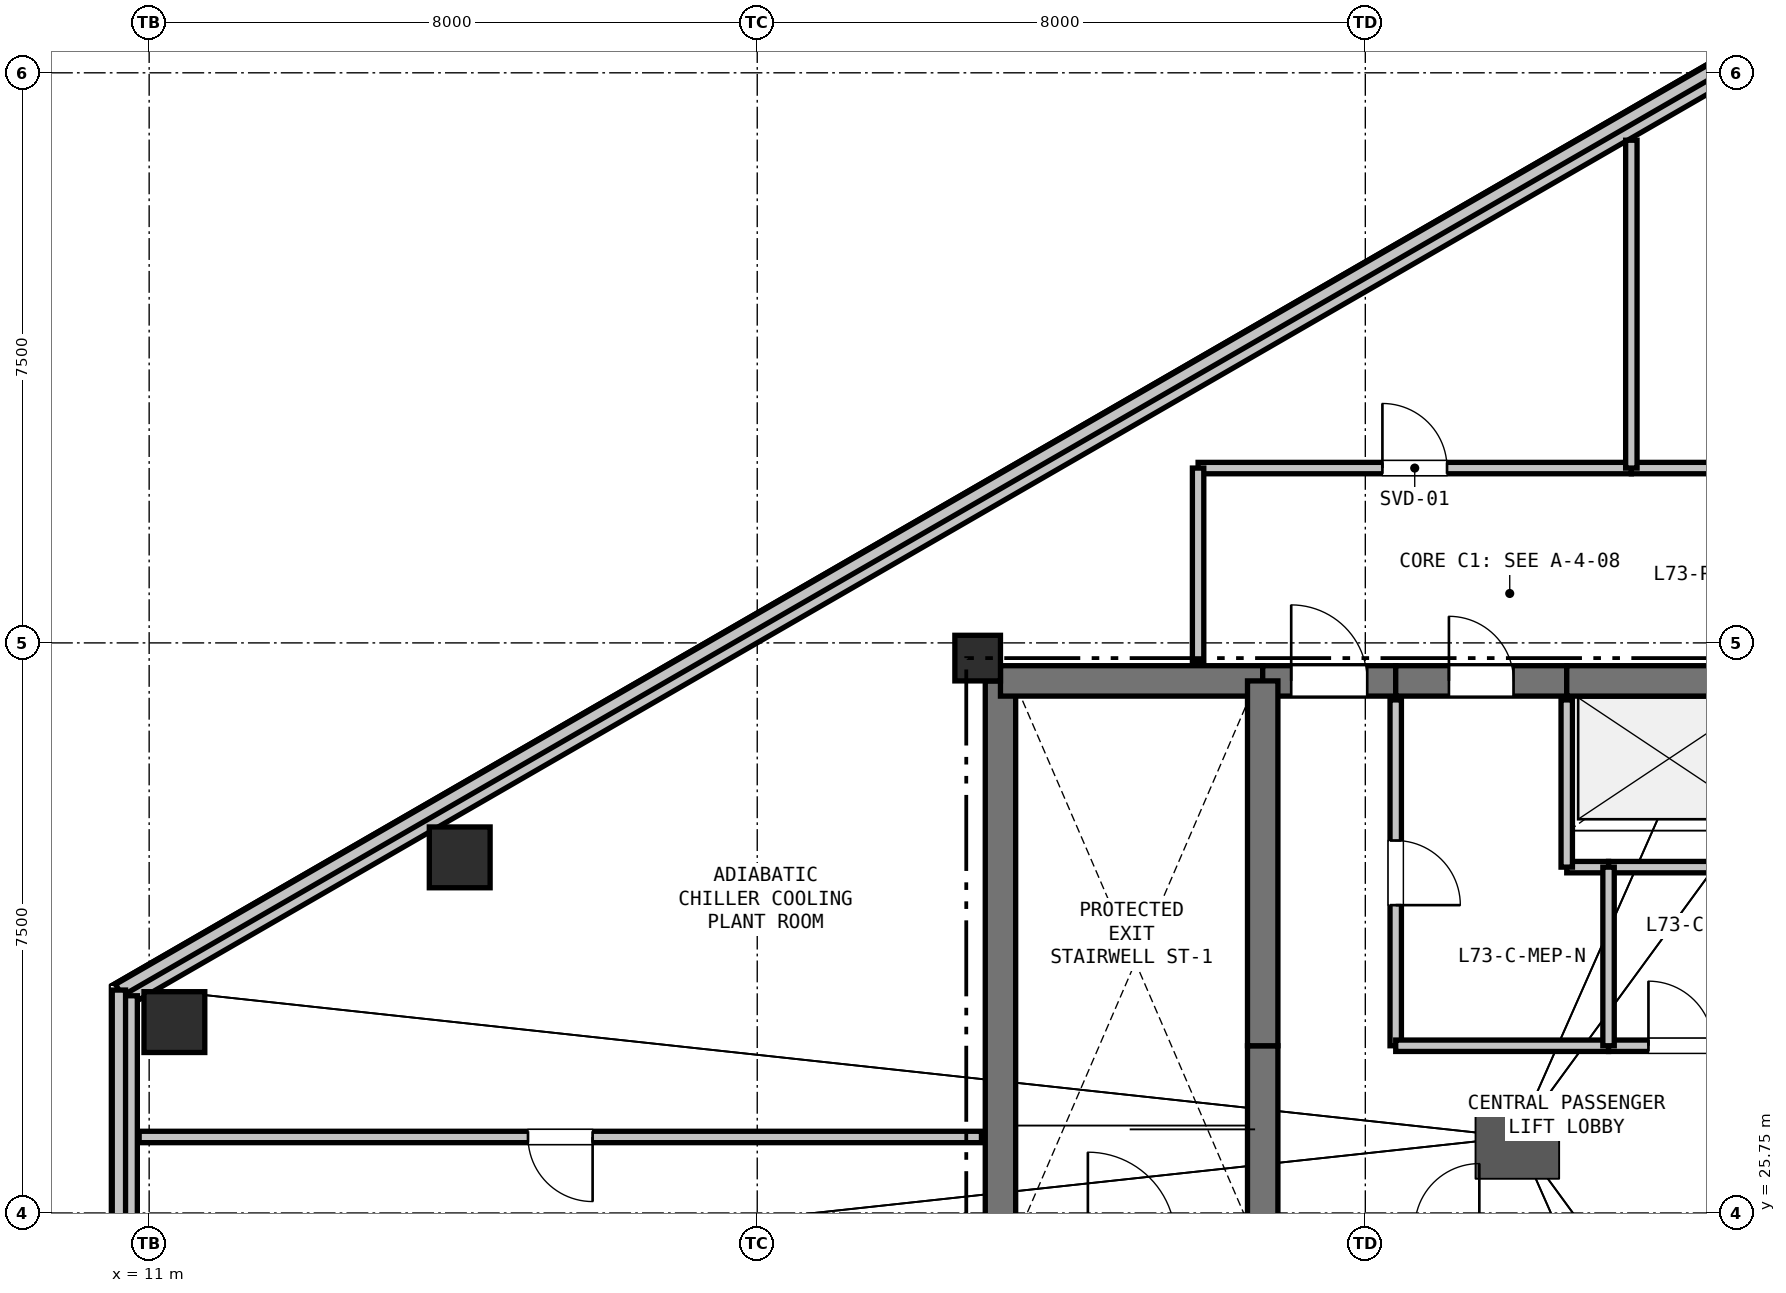
"""IFC4 building model, lengths in metres.
Left out: names, types, materials, properties, quantities, classifications, styles, units other than length and angle.
Written with IfcOpenShell. Run it as: python <this file> out.ifc"""

import sys

from ifc_helpers import new_model, si_unit, direction, frame, frame_2d, origin, origin_2d, place, context, subcontext, project, spatial, rectangle, hollow_rectangle, extrude, element, fill, save


model = new_model("IFC4")
c1 = context("Model", 3, precision=1e-05, world=origin(), true_north=direction((0.0, 1.0)))
c2 = subcontext(c1, "Body", "Model", "MODEL_VIEW")
j1 = project(units=[si_unit("LENGTHUNIT", "METRE"), si_unit("PLANEANGLEUNIT", "RADIAN")], contexts=[c1])
p1 = place(None, origin())
s1 = spatial("IfcSite", under=j1, at=p1, CompositionType="ELEMENT")
p2 = place(p1, origin())
s2 = spatial("IfcBuilding", under=s1, at=p2, CompositionType="ELEMENT")
p3 = place(p2, frame((0.0, 0.0, 264.0)))
s3 = spatial("IfcBuildingStorey", under=s2, at=p3, CompositionType="ELEMENT", Elevation=264.0)
p4 = place(p3, frame((21.9, 33.05, 0.0), z_axis=(0.0, 0.0, 1.0), x_axis=(1.0, 0.0, 0.0)))
e1 = element("IfcColumn", 1, at=p4, inside=s3, PredefinedType="COLUMN", context=c2, shape_type="SweptSolid", body=[
    extrude(rectangle(XDim=0.6, YDim=0.6, at=origin_2d()), origin(), (0.0, 0.0, 1.0), 2.6),
])
for number, where, z_axis, x_axis in (
    (2, (11.332, 28.261, 0.0), (0.0, 0.0, 1.0), (1.0, 0.0, 0.0)),
    (3, (15.086, 30.428, 0.0), (0.0, 0.0, 1.0), (1.0, 0.0, 0.0)),
):
    element("IfcColumn", number, at=place(p3, frame(where, z_axis=z_axis, x_axis=x_axis)), inside=s3, PredefinedType="COLUMN", context=c2, shape_type="SweptSolid", body=[
        extrude(hollow_rectangle(XDim=0.8, YDim=0.8, WallThickness=0.025, at=origin_2d()), origin(), (0.0, 0.0, 1.0), 2.6),
    ])
p5 = place(p3, frame((10.732, 28.608, 0.0), z_axis=(0.0, 0.0, 1.0), x_axis=(0.866023553042, 0.500003205566, 0.0)))
e4 = element("IfcWall", 4, at=p5, inside=s3, PredefinedType="SOLIDWALL", context=c2, shape_type="SweptSolid", body=[
    extrude(rectangle(XDim=29.783, YDim=0.225, at=frame_2d((14.892, 0.0))), origin(), (0.0, 0.0, 1.0), 2.25),
])
p6 = place(p3, frame((10.602, 28.683, 2.7), z_axis=(0.0, 0.0, 1.0), x_axis=(0.866024093284, 0.500002269847, 0.0)))
e5 = element("IfcWall", 5, at=p6, inside=s3, PredefinedType="PARAPET", context=c2, shape_type="SweptSolid", body=[
    extrude(rectangle(XDim=29.933, YDim=0.175, at=frame_2d((14.967, 0.0))), origin(), (0.0, 0.0, 1.0), 1.2),
])
p7 = place(p3, frame((10.732, 24.892, 0.0), z_axis=(0.0, 0.0, 1.0), x_axis=(0.0, 1.0, 0.0)))
e6 = element("IfcWall", 6, at=p7, inside=s3, PredefinedType="SOLIDWALL", context=c2, shape_type="SweptSolid", body=[
    extrude(rectangle(XDim=3.715, YDim=0.225, at=frame_2d((1.858, 0.0))), origin(), (0.0, 0.0, 1.0), 2.25),
])
p8 = place(p3, frame((10.602, 24.817, 2.7), z_axis=(0.0, 0.0, 1.0), x_axis=(0.0, 1.0, 0.0)))
e7 = element("IfcWall", 7, at=p8, inside=s3, PredefinedType="PARAPET", context=c2, shape_type="SweptSolid", body=[
    extrude(rectangle(XDim=3.865, YDim=0.175, at=frame_2d((1.933, 0.0))), origin(), (0.0, 0.0, 1.0), 1.2),
])
p9 = place(p3, frame((22.2, 25.4, 0.0), z_axis=(0.0, 0.0, 1.0), x_axis=(0.0, 1.0, 0.0)))
e8 = element("IfcWall", 8, at=p9, inside=s3, PredefinedType="SHEAR", context=c2, shape_type="SweptSolid", body=[
    extrude(rectangle(XDim=7.35, YDim=0.4, at=frame_2d((3.675, 0.0))), origin(), (0.0, 0.0, 1.0), 2.6),
])
p10 = place(p3, frame((22.2, 32.75, 0.0), z_axis=(0.0, 0.0, 1.0), x_axis=(1.0, 0.0, 0.0)))
e9 = element("IfcWall", 9, at=p10, inside=s3, PredefinedType="SHEAR", context=c2, shape_type="SweptSolid", body=[
    extrude(rectangle(XDim=3.45, YDim=0.4, at=frame_2d((1.725, 0.0))), origin(), (0.0, 0.0, 1.0), 2.6),
])
p11 = place(p3, frame((25.65, 32.75, 0.0), z_axis=(0.0, 0.0, 1.0), x_axis=(1.0, 0.0, 0.0)))
e10 = element("IfcWall", 10, at=p11, inside=s3, PredefinedType="SHEAR", context=c2, shape_type="SweptSolid", body=[
    extrude(rectangle(XDim=1.75, YDim=0.4, at=frame_2d((0.875, 0.0))), origin(), (0.0, 0.0, 1.0), 2.6),
])
p12 = place(p11, frame((0.375, 0.0, 0.0)))
e11 = element("IfcOpeningElement", 11, at=p12, cuts=e10, PredefinedType="OPENING", context=c2, shape_type="SweptSolid", body=[
    extrude(rectangle(XDim=1.0, YDim=2.15, at=frame_2d((0.5, 1.075))), frame((0.0, 0.21, 0.0), z_axis=(0.0, -1.0, 0.0), x_axis=(1.0, 0.0, 0.0)), (0.0, 0.0, 1.0), 0.42),
])
p13 = place(p3, frame((27.4, 32.75, 0.0), z_axis=(0.0, 0.0, 1.0), x_axis=(1.0, 0.0, 0.0)))
e12 = element("IfcWall", 12, at=p13, inside=s3, PredefinedType="SHEAR", context=c2, shape_type="SweptSolid", body=[
    extrude(rectangle(XDim=2.25, YDim=0.4, at=frame_2d((1.125, 0.0))), origin(), (0.0, 0.0, 1.0), 2.6),
])
p14 = place(p13, frame((0.7, 0.0, 0.0)))
e13 = element("IfcOpeningElement", 13, at=p14, cuts=e12, PredefinedType="OPENING", context=c2, shape_type="SweptSolid", body=[
    extrude(rectangle(XDim=0.85, YDim=2.1, at=frame_2d((0.425, 1.05))), frame((0.0, 0.21, 0.0), z_axis=(0.0, -1.0, 0.0), x_axis=(1.0, 0.0, 0.0)), (0.0, 0.0, 1.0), 0.42),
])
p15 = place(p3, frame((29.65, 32.75, 0.0), z_axis=(0.0, 0.0, 1.0), x_axis=(1.0, 0.0, 0.0)))
e14 = element("IfcWall", 14, at=p15, inside=s3, PredefinedType="SHEAR", context=c2, shape_type="SweptSolid", body=[
    extrude(rectangle(XDim=2.7, YDim=0.4, at=frame_2d((1.35, 0.0))), origin(), (0.0, 0.0, 1.0), 2.6),
])
p16 = place(p3, frame((25.65, 25.55, 0.0), z_axis=(0.0, 0.0, 1.0), x_axis=(0.0, 1.0, 0.0)))
e15 = element("IfcWall", 15, at=p16, inside=s3, PredefinedType="SHEAR", context=c2, shape_type="SweptSolid", body=[
    extrude(rectangle(XDim=2.4, YDim=0.4, at=frame_2d((1.2, 0.0))), origin(), (0.0, 0.0, 1.0), 2.6),
])
p17 = place(p3, frame((25.65, 27.95, 0.0), z_axis=(0.0, 0.0, 1.0), x_axis=(0.0, 1.0, 0.0)))
e16 = element("IfcWall", 16, at=p17, inside=s3, PredefinedType="SHEAR", context=c2, shape_type="SweptSolid", body=[
    extrude(rectangle(XDim=4.8, YDim=0.4, at=frame_2d((2.4, 0.0))), origin(), (0.0, 0.0, 1.0), 2.6),
])
p18 = place(p3, frame((32.1, 30.3, 0.0), z_axis=(0.0, 0.0, 1.0), x_axis=(-1.0, 0.0, 0.0)))
e17 = element("IfcWall", 17, at=p18, inside=s3, PredefinedType="PARTITIONING", context=c2, shape_type="SweptSolid", body=[
    extrude(rectangle(XDim=1.9, YDim=0.15, at=frame_2d((0.95, 0.0))), origin(), (0.0, 0.0, 1.0), 2.6),
])
p19 = place(p3, frame((30.2, 30.3, 0.0), z_axis=(0.0, 0.0, 1.0), x_axis=(-1.0, 0.0, 0.0)))
e18 = element("IfcWall", 18, at=p19, inside=s3, PredefinedType="PARTITIONING", context=c2, shape_type="SweptSolid", body=[
    extrude(rectangle(XDim=0.55, YDim=0.15, at=frame_2d((0.275, 0.0))), origin(), (0.0, 0.0, 1.0), 2.6),
])
p20 = place(p3, frame((29.65, 30.3, 0.0), z_axis=(0.0, 0.0, 1.0), x_axis=(0.0, 1.0, 0.0)))
e19 = element("IfcWall", 19, at=p20, inside=s3, PredefinedType="PARTITIONING", context=c2, shape_type="SweptSolid", body=[
    extrude(rectangle(XDim=2.2, YDim=0.15, at=frame_2d((1.1, 0.0))), origin(), (0.0, 0.0, 1.0), 2.6),
])
p21 = place(p3, frame((27.4, 32.5, 0.0), z_axis=(0.0, 0.0, 1.0), x_axis=(0.0, -1.0, 0.0)))
e20 = element("IfcWall", 20, at=p21, inside=s3, PredefinedType="PARTITIONING", context=c2, shape_type="SweptSolid", body=[
    extrude(rectangle(XDim=4.55, YDim=0.15, at=frame_2d((2.275, 0.0))), origin(), (0.0, 0.0, 1.0), 2.6),
])
p22 = place(p21, frame((1.85, 0.0, 0.0)))
e21 = element("IfcOpeningElement", 21, at=p22, cuts=e20, PredefinedType="OPENING", context=c2, shape_type="SweptSolid", body=[
    extrude(rectangle(XDim=0.85, YDim=2.1, at=frame_2d((0.425, 1.05))), frame((0.0, 0.085, 0.0), z_axis=(0.0, -1.0, 0.0), x_axis=(1.0, 0.0, 0.0)), (0.0, 0.0, 1.0), 0.17),
])
p23 = place(p3, frame((27.4, 27.95, 0.0), z_axis=(0.0, 0.0, 1.0), x_axis=(1.0, 0.0, 0.0)))
e22 = element("IfcWall", 22, at=p23, inside=s3, PredefinedType="PARTITIONING", context=c2, shape_type="SweptSolid", body=[
    extrude(rectangle(XDim=2.8, YDim=0.15, at=frame_2d((1.4, 0.0))), origin(), (0.0, 0.0, 1.0), 2.6),
])
p24 = place(p3, frame((30.2, 27.95, 0.0), z_axis=(0.0, 0.0, 1.0), x_axis=(1.0, 0.0, 0.0)))
e23 = element("IfcWall", 23, at=p24, inside=s3, PredefinedType="PARTITIONING", context=c2, shape_type="SweptSolid", body=[
    extrude(rectangle(XDim=1.9, YDim=0.15, at=frame_2d((0.95, 0.0))), origin(), (0.0, 0.0, 1.0), 2.6),
])
p25 = place(p24, frame((0.525, 0.0, 0.0)))
e24 = element("IfcOpeningElement", 24, at=p25, cuts=e23, PredefinedType="OPENING", context=c2, shape_type="SweptSolid", body=[
    extrude(rectangle(XDim=0.85, YDim=2.1, at=frame_2d((0.425, 1.05))), frame((0.0, 0.085, 0.0), z_axis=(0.0, -1.0, 0.0), x_axis=(1.0, 0.0, 0.0)), (0.0, 0.0, 1.0), 0.17),
])
p26 = place(p3, frame((24.8, 35.55, 0.0), z_axis=(0.0, 0.0, 1.0), x_axis=(1.0, 0.0, 0.0)))
e25 = element("IfcWall", 25, at=p26, inside=s3, PredefinedType="PARTITIONING", context=c2, shape_type="SweptSolid", body=[
    extrude(rectangle(XDim=5.7, YDim=0.15, at=frame_2d((2.85, 0.0))), origin(), (0.0, 0.0, 1.0), 2.6),
])
p27 = place(p26, frame((2.425, 0.0, 0.0)))
e26 = element("IfcOpeningElement", 26, at=p27, cuts=e25, PredefinedType="OPENING", context=c2, shape_type="SweptSolid", body=[
    extrude(rectangle(XDim=0.85, YDim=2.1, at=frame_2d((0.425, 1.05))), frame((0.0, 0.085, 0.0), z_axis=(0.0, -1.0, 0.0), x_axis=(1.0, 0.0, 0.0)), (0.0, 0.0, 1.0), 0.17),
])
p28 = place(p3, frame((30.5, 35.55, 0.0), z_axis=(0.0, 0.0, 1.0), x_axis=(1.0, 0.0, 0.0)))
e27 = element("IfcWall", 27, at=p28, inside=s3, PredefinedType="PARTITIONING", context=c2, shape_type="SweptSolid", body=[
    extrude(rectangle(XDim=7.35, YDim=0.15, at=frame_2d((3.675, 0.0))), origin(), (0.0, 0.0, 1.0), 2.6),
])
p29 = place(p28, frame((3.25, 0.0, 0.0)))
e28 = element("IfcOpeningElement", 28, at=p29, cuts=e27, PredefinedType="OPENING", context=c2, shape_type="SweptSolid", body=[
    extrude(rectangle(XDim=0.85, YDim=2.1, at=frame_2d((0.425, 1.05))), frame((0.0, 0.085, 0.0), z_axis=(0.0, -1.0, 0.0), x_axis=(1.0, 0.0, 0.0)), (0.0, 0.0, 1.0), 0.17),
])
p30 = place(p3, frame((24.8, 33.0, 0.0), z_axis=(0.0, 0.0, 1.0), x_axis=(0.0, 1.0, 0.0)))
e29 = element("IfcWall", 29, at=p30, inside=s3, PredefinedType="PARTITIONING", context=c2, shape_type="SweptSolid", body=[
    extrude(rectangle(XDim=2.55, YDim=0.15, at=frame_2d((1.275, 0.0))), origin(), (0.0, 0.0, 1.0), 2.6),
])
p31 = place(p3, frame((30.2, 30.3, 0.0), z_axis=(0.0, 0.0, 1.0), x_axis=(0.0, -1.0, 0.0)))
e30 = element("IfcWall", 30, at=p31, inside=s3, PredefinedType="PARTITIONING", context=c2, shape_type="SweptSolid", body=[
    extrude(rectangle(XDim=2.35, YDim=0.15, at=frame_2d((1.175, 0.0))), origin(), (0.0, 0.0, 1.0), 2.6),
])
p32 = place(p3, frame((30.5, 35.55, 0.0), z_axis=(0.0, 0.0, 1.0), x_axis=(0.0, 1.0, 0.0)))
e31 = element("IfcWall", 31, at=p32, inside=s3, PredefinedType="PARTITIONING", context=c2, shape_type="SweptSolid", body=[
    extrude(rectangle(XDim=4.313, YDim=0.15, at=frame_2d((2.156, 0.0))), origin(), (0.0, 0.0, 1.0), 2.105),
])
p33 = place(p3, frame((21.95, 26.75, 0.0), z_axis=(0.0, 0.0, 1.0), x_axis=(-1.0, 0.0, 0.0)))
e32 = element("IfcWall", 32, at=p33, inside=s3, PredefinedType="PARTITIONING", context=c2, shape_type="SweptSolid", body=[
    extrude(rectangle(XDim=11.082, YDim=0.15, at=frame_2d((5.541, 0.0))), origin(), (0.0, 0.0, 1.0), 2.105),
])
p34 = place(p33, frame((5.116, 0.0, 0.0)))
e33 = element("IfcOpeningElement", 33, at=p34, cuts=e32, PredefinedType="OPENING", context=c2, shape_type="SweptSolid", body=[
    extrude(rectangle(XDim=0.85, YDim=2.09, at=frame_2d((0.425, 1.045))), frame((0.0, 0.085, 0.0), z_axis=(0.0, -1.0, 0.0), x_axis=(1.0, 0.0, 0.0)), (0.0, 0.0, 1.0), 0.17),
])
p35 = place(p12, origin())
e34 = element("IfcDoor", 34, at=p35, inside=s3, OperationType="SINGLE_SWING_LEFT", PredefinedType="DOOR", context=c2, shape_type="SweptSolid", body=[
    extrude(rectangle(XDim=1.0, YDim=2.15, at=frame_2d((0.5, 1.075))), frame((0.0, 0.025, 0.0), z_axis=(0.0, -1.0, 0.0), x_axis=(1.0, 0.0, 0.0)), (0.0, 0.0, 1.0), 0.05),
])
fill(e11, e34)
p36 = place(p22, origin())
e35 = element("IfcDoor", 35, at=p36, inside=s3, OperationType="SINGLE_SWING_RIGHT", PredefinedType="DOOR", context=c2, shape_type="SweptSolid", body=[
    extrude(rectangle(XDim=0.85, YDim=2.1, at=frame_2d((0.425, 1.05))), frame((0.0, 0.025, 0.0), z_axis=(0.0, -1.0, 0.0), x_axis=(1.0, 0.0, 0.0)), (0.0, 0.0, 1.0), 0.05),
])
fill(e21, e35)
p37 = place(p25, origin())
e36 = element("IfcDoor", 36, at=p37, inside=s3, OperationType="SINGLE_SWING_LEFT", PredefinedType="DOOR", context=c2, shape_type="SweptSolid", body=[
    extrude(rectangle(XDim=0.85, YDim=2.1, at=frame_2d((0.425, 1.05))), frame((0.0, 0.025, 0.0), z_axis=(0.0, -1.0, 0.0), x_axis=(1.0, 0.0, 0.0)), (0.0, 0.0, 1.0), 0.05),
])
fill(e24, e36)
p38 = place(p14, origin())
e37 = element("IfcDoor", 37, at=p38, inside=s3, OperationType="SINGLE_SWING_LEFT", PredefinedType="DOOR", context=c2, shape_type="SweptSolid", body=[
    extrude(rectangle(XDim=0.85, YDim=2.1, at=frame_2d((0.425, 1.05))), frame((0.0, 0.025, 0.0), z_axis=(0.0, -1.0, 0.0), x_axis=(1.0, 0.0, 0.0)), (0.0, 0.0, 1.0), 0.05),
])
fill(e13, e37)
p39 = place(p27, origin())
e38 = element("IfcDoor", 38, at=p39, inside=s3, OperationType="SINGLE_SWING_LEFT", PredefinedType="DOOR", context=c2, shape_type="SweptSolid", body=[
    extrude(rectangle(XDim=0.85, YDim=2.1, at=frame_2d((0.425, 1.05))), frame((0.0, 0.025, 0.0), z_axis=(0.0, -1.0, 0.0), x_axis=(1.0, 0.0, 0.0)), (0.0, 0.0, 1.0), 0.05),
])
fill(e26, e38)
p40 = place(p34, origin())
e39 = element("IfcDoor", 39, at=p40, inside=s3, OperationType="SINGLE_SWING_LEFT", PredefinedType="DOOR", context=c2, shape_type="SweptSolid", body=[
    extrude(rectangle(XDim=0.85, YDim=2.09, at=frame_2d((0.425, 1.045))), frame((0.0, 0.025, 0.0), z_axis=(0.0, -1.0, 0.0), x_axis=(1.0, 0.0, 0.0)), (0.0, 0.0, 1.0), 0.05),
])
fill(e33, e39)
save(model, sys.argv[1])
